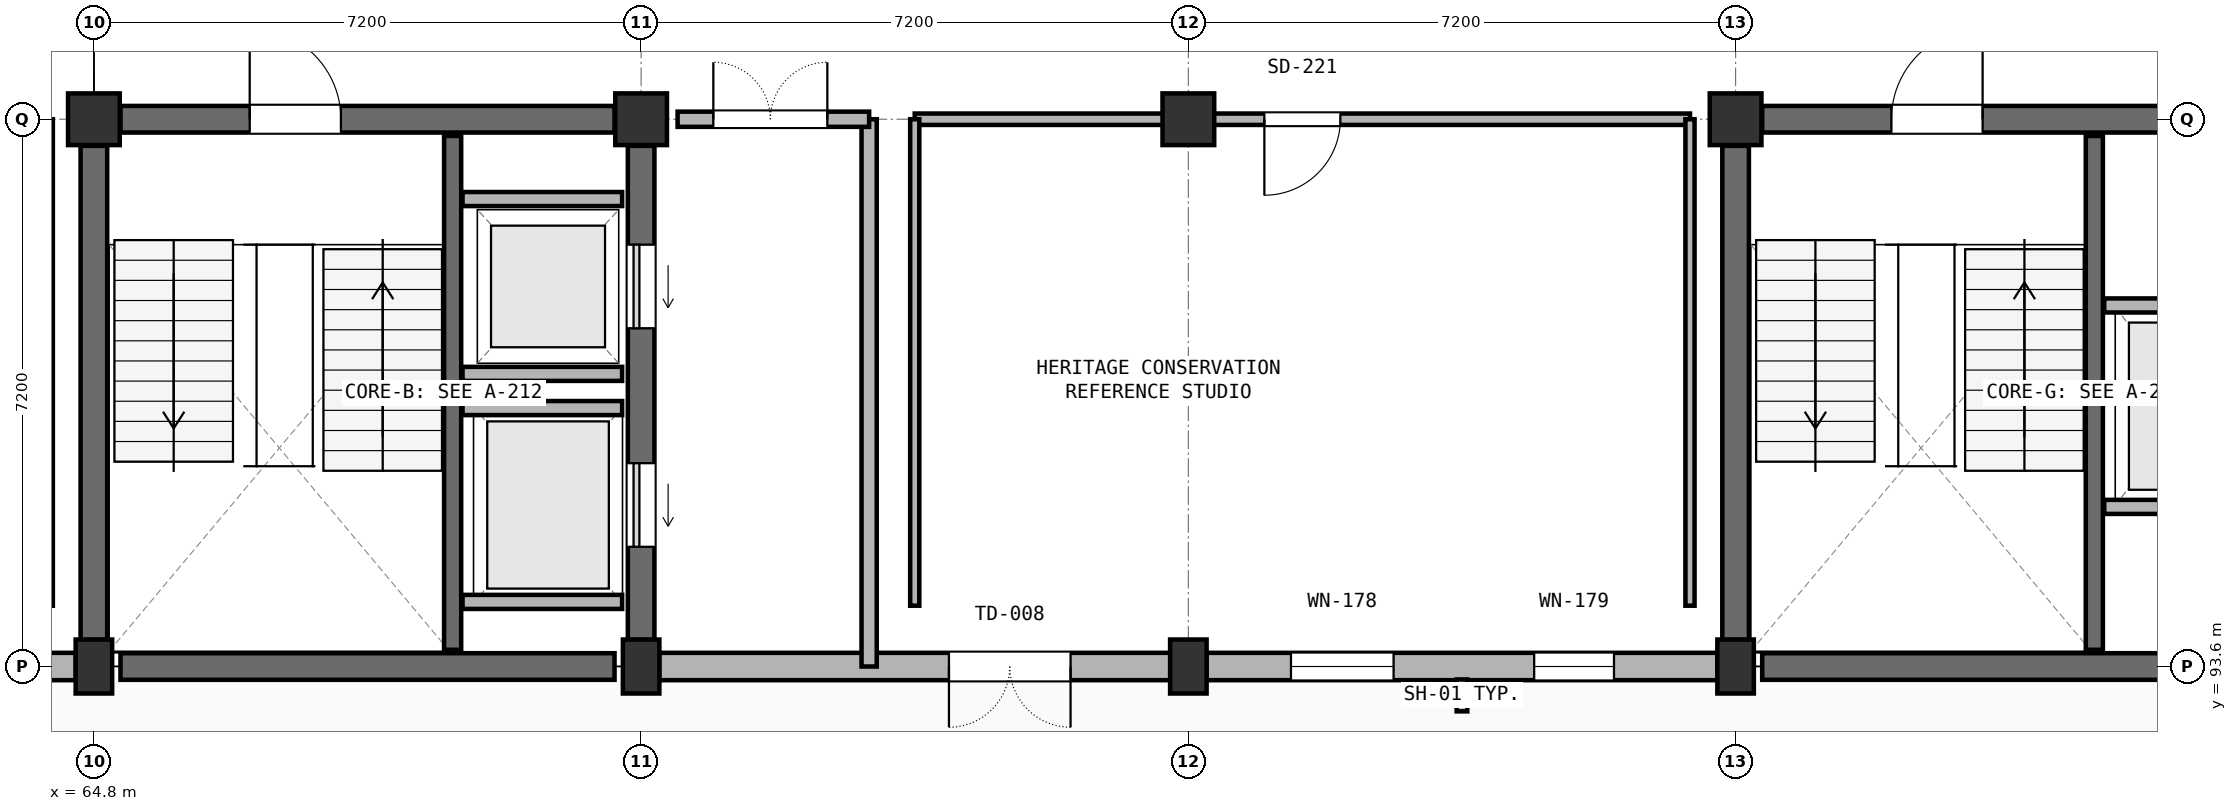
"""IFC4 building model, lengths in metres.
Left out: names, types, materials, properties, quantities, classifications, styles, units other than length and angle.
Written with IfcOpenShell. Run it as: python <this file> out.ifc"""

import sys

from ifc_helpers import new_model, si_unit, direction, frame, frame_2d, origin, origin_2d, place, context, subcontext, project, spatial, rectangle, extrude, element, fill, save


model = new_model("IFC4")
c1 = context("Model", 3, precision=1e-05, world=origin(), true_north=direction((0.0, 1.0)))
c2 = subcontext(c1, "Body", "Model", "MODEL_VIEW")
j1 = project(units=[si_unit("LENGTHUNIT", "METRE"), si_unit("PLANEANGLEUNIT", "RADIAN")], contexts=[c1])
p1 = place(None, origin())
s1 = spatial("IfcSite", under=j1, at=p1, CompositionType="ELEMENT")
p2 = place(p1, origin())
s2 = spatial("IfcBuilding", under=s1, at=p2, CompositionType="ELEMENT")
p3 = place(p2, frame((0.0, 0.0, 22.5)))
s3 = spatial("IfcBuildingStorey", under=s2, at=p3, CompositionType="ELEMENT", Elevation=22.5)
p4 = place(p3, frame((64.8, 93.6, 0.0), z_axis=(0.0, 0.0, 1.0), x_axis=(1.0, 0.0, 0.0)))
e1 = element("IfcColumn", 1, at=p4, inside=s3, PredefinedType="COLUMN", context=c2, shape_type="SweptSolid", body=[
    extrude(rectangle(XDim=0.48, YDim=0.71, at=origin_2d()), origin(), (0.0, 0.0, 1.0), 3.9),
])
p5 = place(p3, frame((64.8, 100.8, 0.0), z_axis=(0.0, 0.0, 1.0), x_axis=(1.0, 0.0, 0.0)))
e2 = element("IfcColumn", 2, at=p5, inside=s3, PredefinedType="COLUMN", context=c2, shape_type="SweptSolid", body=[
    extrude(rectangle(XDim=0.68, YDim=0.68, at=origin_2d()), origin(), (0.0, 0.0, 1.0), 3.9),
])
p6 = place(p3, frame((72.0, 93.6, 0.0), z_axis=(0.0, 0.0, 1.0), x_axis=(1.0, 0.0, 0.0)))
e3 = element("IfcColumn", 3, at=p6, inside=s3, PredefinedType="COLUMN", context=c2, shape_type="SweptSolid", body=[
    extrude(rectangle(XDim=0.48, YDim=0.71, at=origin_2d()), origin(), (0.0, 0.0, 1.0), 3.9),
])
p7 = place(p3, frame((72.0, 100.8, 0.0), z_axis=(0.0, 0.0, 1.0), x_axis=(1.0, 0.0, 0.0)))
e4 = element("IfcColumn", 4, at=p7, inside=s3, PredefinedType="COLUMN", context=c2, shape_type="SweptSolid", body=[
    extrude(rectangle(XDim=0.68, YDim=0.68, at=origin_2d()), origin(), (0.0, 0.0, 1.0), 3.9),
])
p8 = place(p3, frame((79.2, 93.6, 0.0), z_axis=(0.0, 0.0, 1.0), x_axis=(1.0, 0.0, 0.0)))
e5 = element("IfcColumn", 5, at=p8, inside=s3, PredefinedType="COLUMN", context=c2, shape_type="SweptSolid", body=[
    extrude(rectangle(XDim=0.48, YDim=0.71, at=origin_2d()), origin(), (0.0, 0.0, 1.0), 3.9),
])
p9 = place(p3, frame((79.2, 100.8, 0.0), z_axis=(0.0, 0.0, 1.0), x_axis=(1.0, 0.0, 0.0)))
e6 = element("IfcColumn", 6, at=p9, inside=s3, PredefinedType="COLUMN", context=c2, shape_type="SweptSolid", body=[
    extrude(rectangle(XDim=0.68, YDim=0.68, at=origin_2d()), origin(), (0.0, 0.0, 1.0), 3.9),
])
p10 = place(p3, frame((86.4, 93.6, 0.0), z_axis=(0.0, 0.0, 1.0), x_axis=(1.0, 0.0, 0.0)))
e7 = element("IfcColumn", 7, at=p10, inside=s3, PredefinedType="COLUMN", context=c2, shape_type="SweptSolid", body=[
    extrude(rectangle(XDim=0.48, YDim=0.71, at=origin_2d()), origin(), (0.0, 0.0, 1.0), 3.9),
])
p11 = place(p3, frame((86.4, 100.8, 0.0), z_axis=(0.0, 0.0, 1.0), x_axis=(1.0, 0.0, 0.0)))
e8 = element("IfcColumn", 8, at=p11, inside=s3, PredefinedType="COLUMN", context=c2, shape_type="SweptSolid", body=[
    extrude(rectangle(XDim=0.68, YDim=0.68, at=origin_2d()), origin(), (0.0, 0.0, 1.0), 3.9),
])
p12 = place(p3, frame((65.15, 93.6, 0.0), z_axis=(0.0, 0.0, 1.0), x_axis=(1.0, 0.0, 0.0)))
e9 = element("IfcWall", 9, at=p12, inside=s3, PredefinedType="SHEAR", context=c2, shape_type="SweptSolid", body=[
    extrude(rectangle(XDim=6.5, YDim=0.35, at=frame_2d((3.25, 0.0))), origin(), (0.0, 0.0, 1.0), 3.9),
])
p13 = place(p3, frame((72.0, 93.95, 0.0), z_axis=(0.0, 0.0, 1.0), x_axis=(0.0, 1.0, 0.0)))
e10 = element("IfcWall", 10, at=p13, inside=s3, PredefinedType="SHEAR", context=c2, shape_type="SweptSolid", body=[
    extrude(rectangle(XDim=6.5, YDim=0.35, at=frame_2d((3.25, 0.0))), origin(), (0.0, 0.0, 1.0), 3.9),
])
p14 = place(p13, frame((1.225, 0.0, 0.0)))
e11 = element("IfcOpeningElement", 11, at=p14, cuts=e10, PredefinedType="OPENING", context=c2, shape_type="SweptSolid", body=[
    extrude(rectangle(XDim=1.1, YDim=2.2, at=frame_2d((0.55, 1.1))), frame((0.0, 0.185, 0.0), z_axis=(0.0, -1.0, 0.0), x_axis=(1.0, 0.0, 0.0)), (0.0, 0.0, 1.0), 0.37),
])
p15 = place(p13, frame((4.1, 0.0, 0.0)))
e12 = element("IfcOpeningElement", 12, at=p15, cuts=e10, PredefinedType="OPENING", context=c2, shape_type="SweptSolid", body=[
    extrude(rectangle(XDim=1.1, YDim=2.2, at=frame_2d((0.55, 1.1))), frame((0.0, 0.185, 0.0), z_axis=(0.0, -1.0, 0.0), x_axis=(1.0, 0.0, 0.0)), (0.0, 0.0, 1.0), 0.37),
])
p16 = place(p3, frame((71.65, 100.8, 0.0), z_axis=(0.0, 0.0, 1.0), x_axis=(-1.0, 0.0, 0.0)))
e13 = element("IfcWall", 13, at=p16, inside=s3, PredefinedType="SHEAR", context=c2, shape_type="SweptSolid", body=[
    extrude(rectangle(XDim=6.5, YDim=0.35, at=frame_2d((3.25, 0.0))), origin(), (0.0, 0.0, 1.0), 3.9),
])
p17 = place(p16, frame((3.6, 0.0, 0.0)))
e14 = element("IfcOpeningElement", 14, at=p17, cuts=e13, PredefinedType="OPENING", context=c2, shape_type="SweptSolid", body=[
    extrude(rectangle(XDim=1.2, YDim=2.2, at=frame_2d((0.6, 1.1))), frame((0.0, 0.185, 0.0), z_axis=(0.0, -1.0, 0.0), x_axis=(1.0, 0.0, 0.0)), (0.0, 0.0, 1.0), 0.37),
])
p18 = place(p3, frame((64.8, 100.45, 0.0), z_axis=(0.0, 0.0, 1.0), x_axis=(0.0, -1.0, 0.0)))
e15 = element("IfcWall", 15, at=p18, inside=s3, PredefinedType="SHEAR", context=c2, shape_type="SweptSolid", body=[
    extrude(rectangle(XDim=6.5, YDim=0.35, at=frame_2d((3.25, 0.0))), origin(), (0.0, 0.0, 1.0), 3.9),
])
p19 = place(p3, frame((69.52, 93.82, 0.0), z_axis=(0.0, 0.0, 1.0), x_axis=(0.0, 1.0, 0.0)))
e16 = element("IfcWall", 16, at=p19, inside=s3, PredefinedType="SHEAR", context=c2, shape_type="SweptSolid", body=[
    extrude(rectangle(XDim=6.76, YDim=0.225, at=frame_2d((3.38, 0.0))), origin(), (0.0, 0.0, 1.0), 3.9),
])
p20 = place(p3, frame((86.75, 93.6, 0.0), z_axis=(0.0, 0.0, 1.0), x_axis=(1.0, 0.0, 0.0)))
e17 = element("IfcWall", 17, at=p20, inside=s3, PredefinedType="SHEAR", context=c2, shape_type="SweptSolid", body=[
    extrude(rectangle(XDim=6.5, YDim=0.35, at=frame_2d((3.25, 0.0))), origin(), (0.0, 0.0, 1.0), 3.9),
])
p21 = place(p3, frame((93.25, 100.8, 0.0), z_axis=(0.0, 0.0, 1.0), x_axis=(-1.0, 0.0, 0.0)))
e18 = element("IfcWall", 18, at=p21, inside=s3, PredefinedType="SHEAR", context=c2, shape_type="SweptSolid", body=[
    extrude(rectangle(XDim=6.5, YDim=0.35, at=frame_2d((3.25, 0.0))), origin(), (0.0, 0.0, 1.0), 3.9),
])
p22 = place(p21, frame((3.6, 0.0, 0.0)))
e19 = element("IfcOpeningElement", 19, at=p22, cuts=e18, PredefinedType="OPENING", context=c2, shape_type="SweptSolid", body=[
    extrude(rectangle(XDim=1.2, YDim=2.2, at=frame_2d((0.6, 1.1))), frame((0.0, 0.185, 0.0), z_axis=(0.0, -1.0, 0.0), x_axis=(1.0, 0.0, 0.0)), (0.0, 0.0, 1.0), 0.37),
])
p23 = place(p3, frame((86.4, 100.45, 0.0), z_axis=(0.0, 0.0, 1.0), x_axis=(0.0, -1.0, 0.0)))
e20 = element("IfcWall", 20, at=p23, inside=s3, PredefinedType="SHEAR", context=c2, shape_type="SweptSolid", body=[
    extrude(rectangle(XDim=6.5, YDim=0.35, at=frame_2d((3.25, 0.0))), origin(), (0.0, 0.0, 1.0), 3.9),
])
p24 = place(p3, frame((91.12, 93.82, 0.0), z_axis=(0.0, 0.0, 1.0), x_axis=(0.0, 1.0, 0.0)))
e21 = element("IfcWall", 21, at=p24, inside=s3, PredefinedType="SHEAR", context=c2, shape_type="SweptSolid", body=[
    extrude(rectangle(XDim=6.76, YDim=0.225, at=frame_2d((3.38, 0.0))), origin(), (0.0, 0.0, 1.0), 3.9),
])
for number, where, z_axis, x_axis in (
    (22, (69.65, 94.45, 0.0), (0.0, 0.0, 1.0), (1.0, 0.0, 0.0)),
    (23, (69.65, 97.0, 0.0), (0.0, 0.0, 1.0), (1.0, 0.0, 0.0)),
    (24, (69.65, 97.45, 0.0), (0.0, 0.0, 1.0), (1.0, 0.0, 0.0)),
    (25, (69.65, 99.75, 0.0), (0.0, 0.0, 1.0), (1.0, 0.0, 0.0)),
    (26, (91.25, 95.7, 0.0), (0.0, 0.0, 1.0), (1.0, 0.0, 0.0)),
    (27, (91.25, 98.35, 0.0), (0.0, 0.0, 1.0), (1.0, 0.0, 0.0)),
):
    element("IfcWall", number, at=place(p3, frame(where, z_axis=z_axis, x_axis=x_axis)), inside=s3, PredefinedType="PARTITIONING", context=c2, shape_type="SweptSolid", body=[
        extrude(rectangle(XDim=2.1, YDim=0.185, at=frame_2d((1.05, 0.0))), origin(), (0.0, 0.0, 1.0), 3.9),
    ])
p25 = place(p3, frame((57.838, 93.6, 0.0), z_axis=(0.0, 0.0, 1.0), x_axis=(1.0, 0.0, 0.0)))
e28 = element("IfcWall", 28, at=p25, inside=s3, PredefinedType="SOLIDWALL", context=c2, shape_type="SweptSolid", body=[
    extrude(rectangle(XDim=6.724, YDim=0.36, at=frame_2d((3.362, 0.0))), origin(), (0.0, 0.0, 1.0), 2.74),
])
p26 = place(p25, frame((3.812, 0.0, 0.0)))
e29 = element("IfcOpeningElement", 29, at=p26, cuts=e28, PredefinedType="OPENING", context=c2, shape_type="SweptSolid", body=[
    extrude(rectangle(XDim=1.8, YDim=2.35, at=frame_2d((0.9, 1.175))), frame((0.0, 0.19, 0.0), z_axis=(0.0, -1.0, 0.0), x_axis=(1.0, 0.0, 0.0)), (0.0, 0.0, 1.0), 0.38),
])
p27 = place(p3, frame((72.238, 93.6, 0.0), z_axis=(0.0, 0.0, 1.0), x_axis=(1.0, 0.0, 0.0)))
e30 = element("IfcWall", 30, at=p27, inside=s3, PredefinedType="SOLIDWALL", context=c2, shape_type="SweptSolid", body=[
    extrude(rectangle(XDim=6.724, YDim=0.36, at=frame_2d((3.362, 0.0))), origin(), (0.0, 0.0, 1.0), 2.74),
])
p28 = place(p27, frame((3.812, 0.0, 0.0)))
e31 = element("IfcOpeningElement", 31, at=p28, cuts=e30, PredefinedType="OPENING", context=c2, shape_type="SweptSolid", body=[
    extrude(rectangle(XDim=1.6, YDim=2.32, at=frame_2d((0.8, 1.16))), frame((0.0, 0.19, 0.0), z_axis=(0.0, -1.0, 0.0), x_axis=(1.0, 0.0, 0.0)), (0.0, 0.0, 1.0), 0.38),
])
p29 = place(p3, frame((79.438, 93.6, 0.0), z_axis=(0.0, 0.0, 1.0), x_axis=(1.0, 0.0, 0.0)))
e32 = element("IfcWall", 32, at=p29, inside=s3, PredefinedType="SOLIDWALL", context=c2, shape_type="SweptSolid", body=[
    extrude(rectangle(XDim=6.724, YDim=0.36, at=frame_2d((3.362, 0.0))), origin(), (0.0, 0.0, 1.0), 2.74),
])
p30 = place(p29, frame((1.112, 0.0, 0.7)))
e33 = element("IfcOpeningElement", 33, at=p30, cuts=e32, PredefinedType="OPENING", context=c2, shape_type="SweptSolid", body=[
    extrude(rectangle(XDim=1.35, YDim=1.89, at=frame_2d((0.675, 0.945))), frame((0.0, 0.19, 0.0), z_axis=(0.0, -1.0, 0.0), x_axis=(1.0, 0.0, 0.0)), (0.0, 0.0, 1.0), 0.38),
])
p31 = place(p29, frame((4.312, 0.0, 0.7)))
e34 = element("IfcOpeningElement", 34, at=p31, cuts=e32, PredefinedType="OPENING", context=c2, shape_type="SweptSolid", body=[
    extrude(rectangle(XDim=1.05, YDim=1.89, at=frame_2d((0.525, 0.945))), frame((0.0, 0.19, 0.0), z_axis=(0.0, -1.0, 0.0), x_axis=(1.0, 0.0, 0.0)), (0.0, 0.0, 1.0), 0.38),
])
p32 = place(p3, frame((75.0, 93.6, 0.0), z_axis=(0.0, 0.0, 1.0), x_axis=(0.0, 1.0, 0.0)))
e35 = element("IfcWall", 35, at=p32, inside=s3, PredefinedType="PARTITIONING", context=c2, shape_type="SweptSolid", body=[
    extrude(rectangle(XDim=7.2, YDim=0.2, at=frame_2d((3.6, 0.0))), origin(), (0.0, 0.0, 1.0), 2.78),
])
p33 = place(p3, frame((75.0, 100.8, 0.0), z_axis=(0.0, 0.0, 1.0), x_axis=(-1.0, 0.0, 0.0)))
e36 = element("IfcWall", 36, at=p33, inside=s3, PredefinedType="PARTITIONING", context=c2, shape_type="SweptSolid", body=[
    extrude(rectangle(XDim=2.52, YDim=0.2, at=frame_2d((1.26, 0.0))), origin(), (0.0, 0.0, 1.0), 2.78),
])
p34 = place(p33, frame((0.55, 0.0, 0.0)))
e37 = element("IfcOpeningElement", 37, at=p34, cuts=e36, PredefinedType="OPENING", context=c2, shape_type="SweptSolid", body=[
    extrude(rectangle(XDim=1.5, YDim=2.2, at=frame_2d((0.75, 1.1))), frame((0.0, 0.11, 0.0), z_axis=(0.0, -1.0, 0.0), x_axis=(1.0, 0.0, 0.0)), (0.0, 0.0, 1.0), 0.22),
])
p35 = place(p3, frame((64.2, 100.8, 0.0), z_axis=(0.0, 0.0, 1.0), x_axis=(0.0, -1.0, 0.0)))
e38 = element("IfcWall", 38, at=p35, inside=s3, PredefinedType="PARTITIONING", context=c2, shape_type="SweptSolid", body=[
    extrude(rectangle(XDim=6.4, YDim=0.12, at=frame_2d((3.2, 0.0))), origin(), (0.0, 0.0, 1.0), 2.78),
])
p36 = place(p3, frame((85.8, 100.8, 0.0), z_axis=(0.0, 0.0, 1.0), x_axis=(-1.0, 0.0, 0.0)))
e39 = element("IfcWall", 39, at=p36, inside=s3, PredefinedType="PARTITIONING", context=c2, shape_type="SweptSolid", body=[
    extrude(rectangle(XDim=10.2, YDim=0.15, at=frame_2d((5.1, 0.0))), origin(), (0.0, 0.0, 1.0), 2.78),
])
p37 = place(p36, frame((4.6, 0.0, 0.0)))
e40 = element("IfcOpeningElement", 40, at=p37, cuts=e39, PredefinedType="OPENING", context=c2, shape_type="SweptSolid", body=[
    extrude(rectangle(XDim=1.0, YDim=2.15, at=frame_2d((0.5, 1.075))), frame((0.0, 0.085, 0.0), z_axis=(0.0, -1.0, 0.0), x_axis=(1.0, 0.0, 0.0)), (0.0, 0.0, 1.0), 0.17),
])
for number, where, z_axis, x_axis in (
    (41, (75.6, 94.4, 0.0), (0.0, 0.0, 1.0), (0.0, 1.0, 0.0)),
    (42, (85.8, 100.8, 0.0), (0.0, 0.0, 1.0), (0.0, -1.0, 0.0)),
):
    element("IfcWall", number, at=place(p3, frame(where, z_axis=z_axis, x_axis=x_axis)), inside=s3, PredefinedType="PARTITIONING", context=c2, shape_type="SweptSolid", body=[
        extrude(rectangle(XDim=6.4, YDim=0.12, at=frame_2d((3.2, 0.0))), origin(), (0.0, 0.0, 1.0), 2.78),
    ])
p38 = place(p14, origin())
e43 = element("IfcDoor", 43, at=p38, inside=s3, OperationType="SLIDING_TO_LEFT", PredefinedType="DOOR", context=c2, shape_type="SweptSolid", body=[
    extrude(rectangle(XDim=1.1, YDim=2.2, at=frame_2d((0.55, 1.1))), frame((0.0, 0.025, 0.0), z_axis=(0.0, -1.0, 0.0), x_axis=(1.0, 0.0, 0.0)), (0.0, 0.0, 1.0), 0.05),
])
fill(e11, e43)
p39 = place(p15, origin())
e44 = element("IfcDoor", 44, at=p39, inside=s3, OperationType="SLIDING_TO_LEFT", PredefinedType="DOOR", context=c2, shape_type="SweptSolid", body=[
    extrude(rectangle(XDim=1.1, YDim=2.2, at=frame_2d((0.55, 1.1))), frame((0.0, 0.025, 0.0), z_axis=(0.0, -1.0, 0.0), x_axis=(1.0, 0.0, 0.0)), (0.0, 0.0, 1.0), 0.05),
])
fill(e12, e44)
p40 = place(p28, frame((1.6, 0.0, 0.0), z_axis=(0.0, 0.0, 1.0), x_axis=(-1.0, 0.0, 0.0)))
e45 = element("IfcDoor", 45, at=p40, inside=s3, OperationType="DOUBLE_DOOR_SINGLE_SWING", PredefinedType="DOOR", context=c2, shape_type="SweptSolid", body=[
    extrude(rectangle(XDim=1.6, YDim=2.32, at=frame_2d((0.8, 1.16))), frame((0.0, 0.025, 0.0), z_axis=(0.0, -1.0, 0.0), x_axis=(1.0, 0.0, 0.0)), (0.0, 0.0, 1.0), 0.05),
])
fill(e31, e45)
p41 = place(p30, origin())
e46 = element("IfcWindow", 46, at=p41, inside=s3, PartitioningType="DOUBLE_PANEL_VERTICAL", PredefinedType="WINDOW", context=c2, shape_type="SweptSolid", body=[
    extrude(rectangle(XDim=1.35, YDim=1.89, at=frame_2d((0.675, 0.945))), frame((0.0, 0.03, 0.0), z_axis=(0.0, -1.0, 0.0), x_axis=(1.0, 0.0, 0.0)), (0.0, 0.0, 1.0), 0.06),
])
fill(e33, e46)
p42 = place(p31, origin())
e47 = element("IfcWindow", 47, at=p42, inside=s3, PartitioningType="SINGLE_PANEL", PredefinedType="WINDOW", context=c2, shape_type="SweptSolid", body=[
    extrude(rectangle(XDim=1.05, YDim=1.89, at=frame_2d((0.525, 0.945))), frame((0.0, 0.03, 0.0), z_axis=(0.0, -1.0, 0.0), x_axis=(1.0, 0.0, 0.0)), (0.0, 0.0, 1.0), 0.06),
])
fill(e34, e47)
p43 = place(p17, frame((1.2, 0.0, 0.0), z_axis=(0.0, 0.0, 1.0), x_axis=(-1.0, 0.0, 0.0)))
e48 = element("IfcDoor", 48, at=p43, inside=s3, OperationType="SINGLE_SWING_LEFT", PredefinedType="DOOR", context=c2, shape_type="SweptSolid", body=[
    extrude(rectangle(XDim=1.2, YDim=2.2, at=frame_2d((0.6, 1.1))), frame((0.0, 0.025, 0.0), z_axis=(0.0, -1.0, 0.0), x_axis=(1.0, 0.0, 0.0)), (0.0, 0.0, 1.0), 0.05),
])
fill(e14, e48)
p44 = place(p34, frame((1.5, 0.0, 0.0), z_axis=(0.0, 0.0, 1.0), x_axis=(-1.0, 0.0, 0.0)))
e49 = element("IfcDoor", 49, at=p44, inside=s3, OperationType="DOUBLE_DOOR_SINGLE_SWING", PredefinedType="DOOR", context=c2, shape_type="SweptSolid", body=[
    extrude(rectangle(XDim=1.5, YDim=2.2, at=frame_2d((0.75, 1.1))), frame((0.0, 0.025, 0.0), z_axis=(0.0, -1.0, 0.0), x_axis=(1.0, 0.0, 0.0)), (0.0, 0.0, 1.0), 0.05),
])
fill(e37, e49)
p45 = place(p22, frame((1.2, 0.0, 0.0), z_axis=(0.0, 0.0, 1.0), x_axis=(-1.0, 0.0, 0.0)))
e50 = element("IfcDoor", 50, at=p45, inside=s3, OperationType="SINGLE_SWING_RIGHT", PredefinedType="DOOR", context=c2, shape_type="SweptSolid", body=[
    extrude(rectangle(XDim=1.2, YDim=2.2, at=frame_2d((0.6, 1.1))), frame((0.0, 0.025, 0.0), z_axis=(0.0, -1.0, 0.0), x_axis=(1.0, 0.0, 0.0)), (0.0, 0.0, 1.0), 0.05),
])
fill(e19, e50)
p46 = place(p37, origin())
e51 = element("IfcDoor", 51, at=p46, inside=s3, OperationType="SINGLE_SWING_RIGHT", PredefinedType="DOOR", context=c2, shape_type="SweptSolid", body=[
    extrude(rectangle(XDim=1.0, YDim=2.15, at=frame_2d((0.5, 1.075))), frame((0.0, 0.025, 0.0), z_axis=(0.0, -1.0, 0.0), x_axis=(1.0, 0.0, 0.0)), (0.0, 0.0, 1.0), 0.05),
])
fill(e40, e51)
save(model, sys.argv[1])
